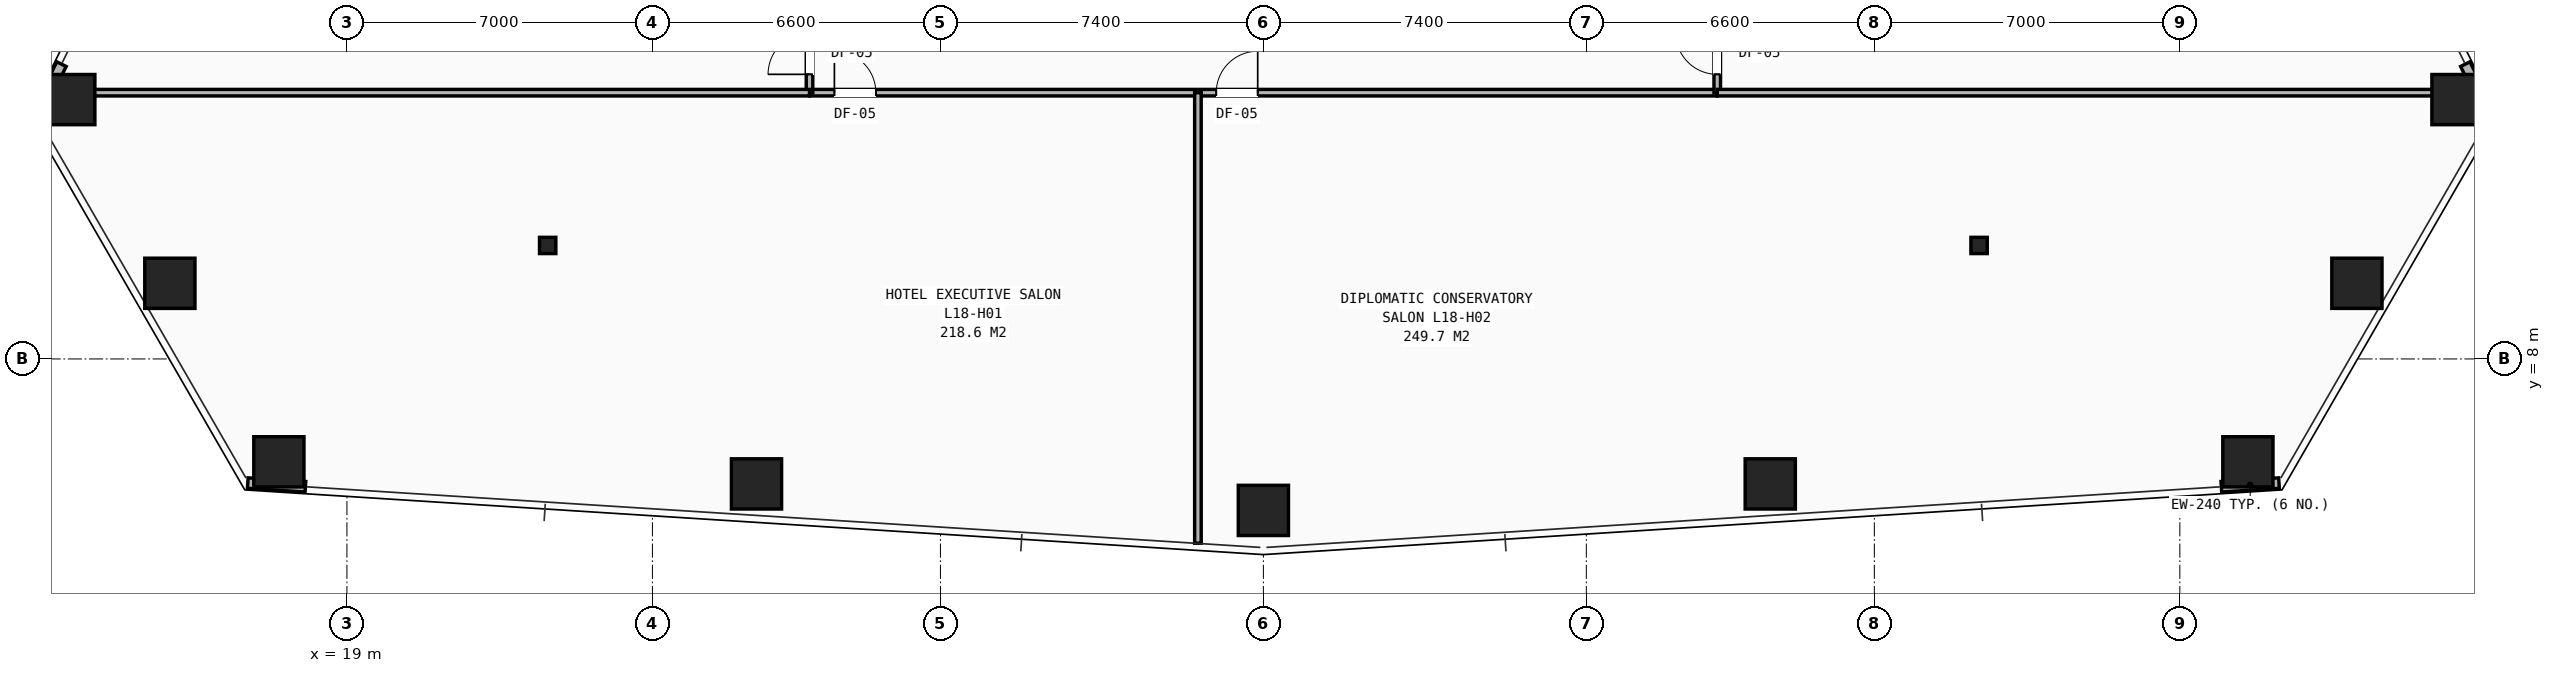
"""IFC4 building model, lengths in metres.
Left out: names, types, materials, properties, quantities, classifications, styles, units other than length and angle.
Written with IfcOpenShell. Run it as: python <this file> out.ifc"""

import sys

from ifc_helpers import new_model, si_unit, direction, frame, frame_2d, origin, origin_2d, place, context, subcontext, project, spatial, rectangle, hollow_rectangle, i_section, extrude, element, fill, save


model = new_model("IFC4")
c1 = context("Model", 3, precision=1e-05, world=origin(), true_north=direction((0.0, 1.0)))
c2 = subcontext(c1, "Body", "Model", "MODEL_VIEW")
j1 = project(units=[si_unit("LENGTHUNIT", "METRE"), si_unit("PLANEANGLEUNIT", "RADIAN")], contexts=[c1])
p1 = place(None, origin())
s1 = spatial("IfcSite", under=j1, at=p1, CompositionType="ELEMENT")
p2 = place(p1, origin())
s2 = spatial("IfcBuilding", under=s1, at=p2, CompositionType="ELEMENT")
p3 = place(p2, frame((0.0, 0.0, 65.6)))
s3 = spatial("IfcBuildingStorey", under=s2, at=p3, CompositionType="ELEMENT", Elevation=65.6)
for number, where, z_axis, x_axis in (
    (1, (23.6, 10.6, 0.0), (0.0, 0.0, 1.0), (1.0, 0.0, 0.0)),
    (2, (56.4, 10.6, 0.0), (0.0, 0.0, 1.0), (1.0, 0.0, 0.0)),
):
    element("IfcColumn", number, at=place(p3, frame(where, z_axis=z_axis, x_axis=x_axis)), inside=s3, PredefinedType="COLUMN", context=c2, shape_type="SweptSolid", body=[
        extrude(i_section(OverallWidth=0.374, OverallDepth=0.372, WebThickness=0.016, FlangeThickness=0.026, at=origin_2d()), origin(), (0.0, 0.0, 1.0), 3.2),
    ])
for number, where, z_axis, x_axis in (
    (3, (12.649, 13.941, 0.0), (0.0, 0.0, 1.0), (1.0, 0.0, 0.0)),
    (4, (14.942, 9.733, 0.0), (0.0, 0.0, 1.0), (1.0, 0.0, 0.0)),
    (5, (17.44, 5.643, 0.0), (0.0, 0.0, 1.0), (1.0, 0.0, 0.0)),
    (6, (28.385, 5.137, 0.0), (0.0, 0.0, 1.0), (1.0, 0.0, 0.0)),
    (7, (40.0, 4.53, 0.0), (0.0, 0.0, 1.0), (1.0, 0.0, 0.0)),
    (8, (51.615, 5.137, 0.0), (0.0, 0.0, 1.0), (1.0, 0.0, 0.0)),
    (9, (62.56, 5.643, 0.0), (0.0, 0.0, 1.0), (1.0, 0.0, 0.0)),
    (10, (65.058, 9.733, 0.0), (0.0, 0.0, 1.0), (1.0, 0.0, 0.0)),
    (11, (67.351, 13.941, 0.0), (0.0, 0.0, 1.0), (1.0, 0.0, 0.0)),
):
    element("IfcColumn", number, at=place(p3, frame(where, z_axis=z_axis, x_axis=x_axis)), inside=s3, PredefinedType="COLUMN", context=c2, shape_type="SweptSolid", body=[
        extrude(hollow_rectangle(XDim=1.15, YDim=1.15, WallThickness=0.075, at=origin_2d()), origin(), (0.0, 0.0, 1.0), 3.2),
    ])
p4 = place(p3, frame((12.459, 14.754, 0.0), z_axis=(0.0, 0.0, 1.0), x_axis=(-0.444037765369, -0.896008070793, 0.0)))
e12 = element("IfcWall", 12, at=p4, inside=s3, PredefinedType="SHEAR", context=c2, shape_type="SweptSolid", body=[
    extrude(rectangle(XDim=1.323, YDim=0.24, at=frame_2d((0.662, 0.0))), origin(), (0.0, 0.0, 1.0), 2.183),
])
for number, where, z_axis, x_axis in (
    (13, (16.728, 5.156, 0.0), (0.0, 0.0, 1.0), (0.998, -0.063, 0.0)),
    (14, (61.951, 5.072, 0.0), (0.0, 0.0, 1.0), (0.998, 0.063, 0.0)),
):
    element("IfcWall", number, at=place(p3, frame(where, z_axis=z_axis, x_axis=x_axis)), inside=s3, PredefinedType="SHEAR", context=c2, shape_type="SweptSolid", body=[
        extrude(rectangle(XDim=1.324, YDim=0.24, at=frame_2d((0.662, 0.0))), origin(), (0.0, 0.0, 1.0), 2.183),
    ])
p5 = place(p3, frame((68.129, 13.568, 0.0), z_axis=(0.0, 0.0, 1.0), x_axis=(-0.444037765369, 0.896008070793, 0.0)))
e15 = element("IfcWall", 15, at=p5, inside=s3, PredefinedType="SHEAR", context=c2, shape_type="SweptSolid", body=[
    extrude(rectangle(XDim=1.323, YDim=0.24, at=frame_2d((0.662, 0.0))), origin(), (0.0, 0.0, 1.0), 2.183),
])
p6 = place(p3, frame((29.6, 14.1, 0.0), z_axis=(0.0, 0.0, 1.0), x_axis=(1.0, 0.0, 0.0)))
e16 = element("IfcWall", 16, at=p6, inside=s3, PredefinedType="PARTITIONING", context=c2, shape_type="SweptSolid", body=[
    extrude(rectangle(XDim=20.8, YDim=0.15, at=frame_2d((10.4, 0.0))), origin(), (0.0, 0.0, 1.0), 2.351),
])
p7 = place(p6, frame((0.57, 0.0, 0.0)))
e17 = element("IfcOpeningElement", 17, at=p7, cuts=e16, PredefinedType="OPENING", context=c2, shape_type="SweptSolid", body=[
    extrude(rectangle(XDim=0.95, YDim=2.1, at=frame_2d((0.475, 1.05))), frame((0.0, 0.085, 0.0), z_axis=(0.0, -1.0, 0.0), x_axis=(1.0, 0.0, 0.0)), (0.0, 0.0, 1.0), 0.17),
])
p8 = place(p6, frame((9.32, 0.0, 0.0)))
e18 = element("IfcOpeningElement", 18, at=p8, cuts=e16, PredefinedType="OPENING", context=c2, shape_type="SweptSolid", body=[
    extrude(rectangle(XDim=0.95, YDim=2.1, at=frame_2d((0.475, 1.05))), frame((0.0, 0.085, 0.0), z_axis=(0.0, -1.0, 0.0), x_axis=(1.0, 0.0, 0.0)), (0.0, 0.0, 1.0), 0.17),
])
p9 = place(p3, frame((29.6, 14.1, 0.0), z_axis=(0.0, 0.0, 1.0), x_axis=(0.0, 1.0, 0.0)))
e19 = element("IfcWall", 19, at=p9, inside=s3, PredefinedType="PARTITIONING", context=c2, shape_type="SweptSolid", body=[
    extrude(rectangle(XDim=21.9, YDim=0.15, at=frame_2d((10.95, 0.0))), origin(), (0.0, 0.0, 1.0), 2.351),
])
p10 = place(p9, frame((0.42, 0.0, 0.0)))
e20 = element("IfcOpeningElement", 20, at=p10, cuts=e19, PredefinedType="OPENING", context=c2, shape_type="SweptSolid", body=[
    extrude(rectangle(XDim=0.95, YDim=2.1, at=frame_2d((0.475, 1.05))), frame((0.0, 0.085, 0.0), z_axis=(0.0, -1.0, 0.0), x_axis=(1.0, 0.0, 0.0)), (0.0, 0.0, 1.0), 0.17),
])
p11 = place(p3, frame((50.4, 14.1, 0.0), z_axis=(0.0, 0.0, 1.0), x_axis=(0.0, 1.0, 0.0)))
e21 = element("IfcWall", 21, at=p11, inside=s3, PredefinedType="PARTITIONING", context=c2, shape_type="SweptSolid", body=[
    extrude(rectangle(XDim=21.9, YDim=0.15, at=frame_2d((10.95, 0.0))), origin(), (0.0, 0.0, 1.0), 2.351),
])
p12 = place(p11, frame((0.42, 0.0, 0.0)))
e22 = element("IfcOpeningElement", 22, at=p12, cuts=e21, PredefinedType="OPENING", context=c2, shape_type="SweptSolid", body=[
    extrude(rectangle(XDim=0.95, YDim=2.1, at=frame_2d((0.475, 1.05))), frame((0.0, 0.085, 0.0), z_axis=(0.0, -1.0, 0.0), x_axis=(1.0, 0.0, 0.0)), (0.0, 0.0, 1.0), 0.17),
])
p13 = place(p11, frame((11.32, 0.0, 0.0)))
e23 = element("IfcOpeningElement", 23, at=p13, cuts=e21, PredefinedType="OPENING", context=c2, shape_type="SweptSolid", body=[
    extrude(rectangle(XDim=0.95, YDim=2.1, at=frame_2d((0.475, 1.05))), frame((0.0, 0.085, 0.0), z_axis=(0.0, -1.0, 0.0), x_axis=(1.0, 0.0, 0.0)), (0.0, 0.0, 1.0), 0.17),
])
p14 = place(p3, frame((38.5, 3.778, 0.0), z_axis=(0.0, 0.0, 1.0), x_axis=(0.0, 1.0, 0.0)))
e24 = element("IfcWall", 24, at=p14, inside=s3, PredefinedType="PARTITIONING", context=c2, shape_type="SweptSolid", body=[
    extrude(rectangle(XDim=10.322, YDim=0.15, at=frame_2d((5.161, 0.0))), origin(), (0.0, 0.0, 1.0), 2.188),
])
for number, where, z_axis, x_axis in (
    (25, (12.141, 14.1, 0.0), (0.0, 0.0, 1.0), (1.0, 0.0, 0.0)),
    (26, (50.4, 14.1, 0.0), (0.0, 0.0, 1.0), (1.0, 0.0, 0.0)),
):
    element("IfcWall", number, at=place(p3, frame(where, z_axis=z_axis, x_axis=x_axis)), inside=s3, PredefinedType="PARTITIONING", context=c2, shape_type="SweptSolid", body=[
        extrude(rectangle(XDim=17.459, YDim=0.15, at=frame_2d((8.73, 0.0))), origin(), (0.0, 0.0, 1.0), 2.188),
    ])
p15 = place(p7, origin())
e27 = element("IfcDoor", 27, at=p15, inside=s3, OperationType="SINGLE_SWING_LEFT", PredefinedType="DOOR", context=c2, shape_type="SweptSolid", body=[
    extrude(rectangle(XDim=0.95, YDim=2.1, at=frame_2d((0.475, 1.05))), frame((0.0, 0.025, 0.0), z_axis=(0.0, -1.0, 0.0), x_axis=(1.0, 0.0, 0.0)), (0.0, 0.0, 1.0), 0.05),
])
fill(e17, e27)
p16 = place(p8, origin())
e28 = element("IfcDoor", 28, at=p16, inside=s3, OperationType="SINGLE_SWING_RIGHT", PredefinedType="DOOR", context=c2, shape_type="SweptSolid", body=[
    extrude(rectangle(XDim=0.95, YDim=2.1, at=frame_2d((0.475, 1.05))), frame((0.0, 0.025, 0.0), z_axis=(0.0, -1.0, 0.0), x_axis=(1.0, 0.0, 0.0)), (0.0, 0.0, 1.0), 0.05),
])
fill(e18, e28)
p17 = place(p10, origin())
e29 = element("IfcDoor", 29, at=p17, inside=s3, OperationType="SINGLE_SWING_LEFT", PredefinedType="DOOR", context=c2, shape_type="SweptSolid", body=[
    extrude(rectangle(XDim=0.95, YDim=2.1, at=frame_2d((0.475, 1.05))), frame((0.0, 0.025, 0.0), z_axis=(0.0, -1.0, 0.0), x_axis=(1.0, 0.0, 0.0)), (0.0, 0.0, 1.0), 0.05),
])
fill(e20, e29)
p18 = place(p12, origin())
e30 = element("IfcDoor", 30, at=p18, inside=s3, OperationType="SINGLE_SWING_RIGHT", PredefinedType="DOOR", context=c2, shape_type="SweptSolid", body=[
    extrude(rectangle(XDim=0.95, YDim=2.1, at=frame_2d((0.475, 1.05))), frame((0.0, 0.025, 0.0), z_axis=(0.0, -1.0, 0.0), x_axis=(1.0, 0.0, 0.0)), (0.0, 0.0, 1.0), 0.05),
])
fill(e22, e30)
save(model, sys.argv[1])
